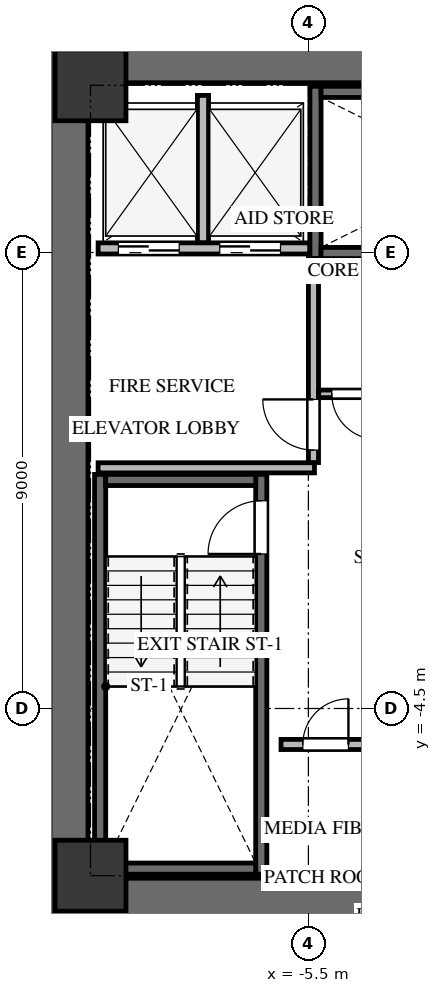
"""IFC4 building model, lengths in metres.
Left out: names, types, materials, properties, quantities, classifications, styles, units other than length and angle.
Written with IfcOpenShell. Run it as: python <this file> out.ifc"""

import sys

from ifc_helpers import new_model, si_unit, direction, frame, frame_2d, origin, origin_2d, place, context, subcontext, project, spatial, rectangle, extrude, source, transform, mapped, element, fill, save


model = new_model("IFC4")
c1 = context("Model", 3, precision=1e-05, world=origin(), true_north=direction((0.0, 1.0)))
c2 = subcontext(c1, "Body", "Model", "MODEL_VIEW")
j1 = project(units=[si_unit("LENGTHUNIT", "METRE"), si_unit("PLANEANGLEUNIT", "RADIAN")], contexts=[c1])
p1 = place(None, origin())
s1 = spatial("IfcSite", under=j1, at=p1, CompositionType="ELEMENT")
p2 = place(p1, origin())
s2 = spatial("IfcBuilding", under=s1, at=p2, CompositionType="ELEMENT")
p3 = place(p2, frame((0.0, 0.0, 110.7)))
s3 = spatial("IfcBuildingStorey", under=s2, at=p3, CompositionType="ELEMENT", Elevation=110.7)
p4 = place(p3, frame((-10.225, -8.6, 0.0), z_axis=(0.0, 0.0, 1.0), x_axis=(0.0, 1.0, 0.0)))
e1 = element("IfcWall", 1, at=p4, inside=s3, PredefinedType="SHEAR", context=c2, shape_type="SweptSolid", body=[
    extrude(rectangle(XDim=17.2, YDim=0.75, at=frame_2d((8.6, 0.0))), origin(), (0.0, 0.0, 1.0), 3.3),
])
p5 = place(p3, frame((-9.85, -8.225, 0.0), z_axis=(0.0, 0.0, 1.0), x_axis=(1.0, 0.0, 0.0)))
e2 = element("IfcWall", 2, at=p5, inside=s3, PredefinedType="SHEAR", context=c2, shape_type="SweptSolid", body=[
    extrude(rectangle(XDim=7.75, YDim=0.75, at=frame_2d((3.875, 0.0))), origin(), (0.0, 0.0, 1.0), 3.3),
])
p6 = place(p3, frame((-9.85, 8.225, 0.0), z_axis=(0.0, 0.0, 1.0), x_axis=(1.0, 0.0, 0.0)))
e3 = element("IfcWall", 3, at=p6, inside=s3, PredefinedType="SHEAR", context=c2, shape_type="SweptSolid", body=[
    extrude(rectangle(XDim=19.7, YDim=0.75, at=frame_2d((9.85, 0.0))), origin(), (0.0, 0.0, 1.0), 3.3),
])
p7 = place(p3, frame((-6.43, -7.77, -0.24), z_axis=(0.0, 0.0, 1.0), x_axis=(0.0, 1.0, 0.0)))
e4 = element("IfcWall", 4, at=p7, inside=s3, PredefinedType="SHEAR", context=c2, shape_type="SweptSolid", body=[
    extrude(rectangle(XDim=7.89, YDim=0.22, at=frame_2d((3.945, 0.0))), origin(), (0.0, 0.0, 1.0), 3.3),
])
p8 = place(p7, frame((6.32, 0.0, 0.0)))
e5 = element("IfcOpeningElement", 5, at=p8, cuts=e4, PredefinedType="OPENING", context=c2, shape_type="SweptSolid", body=[
    extrude(rectangle(XDim=1.05, YDim=2.15, at=frame_2d((0.525, 1.075))), frame((0.0, 0.12, 0.0), z_axis=(0.0, -1.0, 0.0), x_axis=(1.0, 0.0, 0.0)), (0.0, 0.0, 1.0), 0.24),
])
p9 = place(p3, frame((-9.61, 0.12, -0.24), z_axis=(0.0, 0.0, 1.0), x_axis=(0.0, -1.0, 0.0)))
e6 = element("IfcWall", 6, at=p9, inside=s3, PredefinedType="SHEAR", context=c2, shape_type="SweptSolid", body=[
    extrude(rectangle(XDim=7.89, YDim=0.22, at=frame_2d((3.945, 0.0))), origin(), (0.0, 0.0, 1.0), 3.3),
])
for number, where, z_axis, x_axis in (
    (7, (-9.5, -7.66, -0.24), (0.0, 0.0, 1.0), (1.0, 0.0, 0.0)),
    (8, (-6.54, 0.01, -0.24), (0.0, 0.0, 1.0), (-1.0, 0.0, 0.0)),
):
    element("IfcWall", number, at=place(p3, frame(where, z_axis=z_axis, x_axis=x_axis)), inside=s3, PredefinedType="SHEAR", context=c2, shape_type="SweptSolid", body=[
        extrude(rectangle(XDim=2.96, YDim=0.22, at=frame_2d((1.48, 0.0))), origin(), (0.0, 0.0, 1.0), 3.3),
    ])
p10 = place(p3, frame((-5.36, 7.78, -0.24), z_axis=(0.0, 0.0, 1.0), x_axis=(0.0, -1.0, 0.0)))
e9 = element("IfcWall", 9, at=p10, inside=s3, PredefinedType="SHEAR", context=c2, shape_type="SweptSolid", body=[
    extrude(rectangle(XDim=3.4, YDim=0.22, at=frame_2d((1.7, 0.0))), origin(), (0.0, 0.0, 1.0), 3.3),
])
p11 = place(p3, frame((-5.25, 4.49, -0.24), z_axis=(0.0, 0.0, 1.0), x_axis=(1.0, 0.0, 0.0)))
e10 = element("IfcWall", 10, at=p11, inside=s3, PredefinedType="SHEAR", context=c2, shape_type="SweptSolid", body=[
    extrude(rectangle(XDim=7.35, YDim=0.22, at=frame_2d((3.675, 0.0))), origin(), (0.0, 0.0, 1.0), 3.3),
])
p12 = place(p11, frame((5.85, 0.0, 0.0)))
e11 = element("IfcOpeningElement", 11, at=p12, cuts=e10, PredefinedType="OPENING", context=c2, shape_type="SweptSolid", body=[
    extrude(rectangle(XDim=1.05, YDim=2.15, at=frame_2d((0.525, 1.075))), frame((0.0, 0.12, 0.0), z_axis=(0.0, -1.0, 0.0), x_axis=(1.0, 0.0, 0.0)), (0.0, 0.0, 1.0), 0.24),
])
p13 = place(p3, frame((2.1, 7.67, -0.24), z_axis=(0.0, 0.0, 1.0), x_axis=(-1.0, 0.0, 0.0)))
e12 = element("IfcWall", 12, at=p13, inside=s3, PredefinedType="SHEAR", context=c2, shape_type="SweptSolid", body=[
    extrude(rectangle(XDim=7.35, YDim=0.22, at=frame_2d((3.675, 0.0))), origin(), (0.0, 0.0, 1.0), 3.3),
])
m1 = source(origin(), c2, "Body", "SweptSolid", [
    extrude(rectangle(XDim=1.4, YDim=1.4, at=origin_2d()), origin(), (0.0, 0.0, 1.0), 3.3),
])
for number, where, z_axis, x_axis in (
    (13, (-9.8, -7.8, -0.24), (0.0, 0.0, 1.0), (1.0, 0.0, 0.0)),
    (14, (-9.8, 7.8, -0.24), (0.0, 0.0, 1.0), (1.0, 0.0, 0.0)),
):
    element("IfcColumn", number, at=place(p3, frame(where, z_axis=z_axis, x_axis=x_axis)), inside=s3, PredefinedType="COLUMN", context=c2, shape_type="MappedRepresentation", body=[
        mapped(m1, transform((0.0, 0.0, 0.0), x_axis=(1.0, 0.0, 0.0), y_axis=(0.0, 1.0, 0.0), z_axis=(0.0, 0.0, 1.0), scale=1.0)),
    ])
p14 = place(p3, frame((-9.65, 4.58, 0.0), z_axis=(0.0, 0.0, 1.0), x_axis=(1.0, 0.0, 0.0)))
e15 = element("IfcWall", 15, at=p14, inside=s3, PredefinedType="SOLIDWALL", context=c2, shape_type="SweptSolid", body=[
    extrude(rectangle(XDim=4.175, YDim=0.22, at=frame_2d((2.087, 0.0))), origin(), (0.0, 0.0, 1.0), 3.045),
])
p15 = place(p14, frame((0.4, 0.0, 0.0)))
e16 = element("IfcOpeningElement", 16, at=p15, cuts=e15, PredefinedType="OPENING", context=c2, shape_type="SweptSolid", body=[
    extrude(rectangle(XDim=1.2, YDim=2.15, at=frame_2d((0.6, 1.075))), frame((0.0, 0.12, 0.0), z_axis=(0.0, -1.0, 0.0), x_axis=(1.0, 0.0, 0.0)), (0.0, 0.0, 1.0), 0.24),
])
p16 = place(p14, frame((2.4, 0.0, 0.0)))
e17 = element("IfcOpeningElement", 17, at=p16, cuts=e15, PredefinedType="OPENING", context=c2, shape_type="SweptSolid", body=[
    extrude(rectangle(XDim=1.2, YDim=2.15, at=frame_2d((0.6, 1.075))), frame((0.0, 0.12, 0.0), z_axis=(0.0, -1.0, 0.0), x_axis=(1.0, 0.0, 0.0)), (0.0, 0.0, 1.0), 0.24),
])
p17 = place(p3, frame((-7.58, 4.694, 0.0), z_axis=(0.0, 0.0, 1.0), x_axis=(0.0, 1.0, 0.0)))
e18 = element("IfcWall", 18, at=p17, inside=s3, PredefinedType="SOLIDWALL", context=c2, shape_type="SweptSolid", body=[
    extrude(rectangle(XDim=2.906, YDim=0.22, at=frame_2d((1.453, 0.0))), origin(), (0.0, 0.0, 1.0), 3.045),
])
p18 = place(p3, frame((-9.65, 0.25, 0.0), z_axis=(0.0, 0.0, 1.0), x_axis=(1.0, 0.0, 0.0)))
e19 = element("IfcWall", 19, at=p18, inside=s3, PredefinedType="SOLIDWALL", context=c2, shape_type="SweptSolid", body=[
    extrude(rectangle(XDim=4.27, YDim=0.2, at=frame_2d((2.135, 0.0))), origin(), (0.0, 0.0, 1.0), 3.045),
])
p19 = place(p3, frame((-5.4, 0.354, 0.0), z_axis=(0.0, 0.0, 1.0), x_axis=(0.0, 1.0, 0.0)))
e20 = element("IfcWall", 20, at=p19, inside=s3, PredefinedType="SOLIDWALL", context=c2, shape_type="SweptSolid", body=[
    extrude(rectangle(XDim=4.026, YDim=0.2, at=frame_2d((2.013, 0.0))), origin(), (0.0, 0.0, 1.0), 3.045),
])
p20 = place(p19, frame((0.246, 0.0, 0.0)))
e21 = element("IfcOpeningElement", 21, at=p20, cuts=e20, PredefinedType="OPENING", context=c2, shape_type="SweptSolid", body=[
    extrude(rectangle(XDim=1.0, YDim=2.15, at=frame_2d((0.5, 1.075))), frame((0.0, 0.11, 0.0), z_axis=(0.0, -1.0, 0.0), x_axis=(1.0, 0.0, 0.0)), (0.0, 0.0, 1.0), 0.22),
])
p21 = place(p3, frame((-6.04, -5.21, 0.0), z_axis=(0.0, 0.0, 1.0), x_axis=(1.0, 0.0, 0.0)))
e22 = element("IfcWall", 22, at=p21, inside=s3, PredefinedType="SOLIDWALL", context=c2, shape_type="SweptSolid", body=[
    extrude(rectangle(XDim=1.76, YDim=0.2, at=frame_2d((0.88, 0.0))), origin(), (0.0, 0.0, 1.0), 3.045),
])
p22 = place(p21, frame((0.43, 0.0, 0.0)))
e23 = element("IfcOpeningElement", 23, at=p22, cuts=e22, PredefinedType="OPENING", context=c2, shape_type="SweptSolid", body=[
    extrude(rectangle(XDim=0.9, YDim=2.05, at=frame_2d((0.45, 1.025))), frame((0.0, 0.11, 0.0), z_axis=(0.0, -1.0, 0.0), x_axis=(1.0, 0.0, 0.0)), (0.0, 0.0, 1.0), 0.22),
])
p23 = place(p3, frame((-3.88, 1.71, 0.0), z_axis=(0.0, 0.0, 1.0), x_axis=(-1.0, 0.0, 0.0)))
e24 = element("IfcWall", 24, at=p23, inside=s3, PredefinedType="PARTITIONING", context=c2, shape_type="SweptSolid", body=[
    extrude(rectangle(XDim=1.416, YDim=0.15, at=frame_2d((0.708, 0.0))), origin(), (0.0, 0.0, 1.0), 3.045),
])
p24 = place(p23, frame((0.258, 0.0, 0.0)))
e25 = element("IfcOpeningElement", 25, at=p24, cuts=e24, PredefinedType="OPENING", context=c2, shape_type="SweptSolid", body=[
    extrude(rectangle(XDim=0.9, YDim=2.05, at=frame_2d((0.45, 1.025))), frame((0.0, 0.085, 0.0), z_axis=(0.0, -1.0, 0.0), x_axis=(1.0, 0.0, 0.0)), (0.0, 0.0, 1.0), 0.17),
])
m2 = source(origin(), c2, "Body", "SweptSolid", [
    extrude(rectangle(XDim=1.05, YDim=2.15, at=frame_2d((0.525, 1.075))), frame((0.0, 0.025, 0.0), z_axis=(0.0, -1.0, 0.0), x_axis=(1.0, 0.0, 0.0)), (0.0, 0.0, 1.0), 0.05),
])
p25 = place(p8, origin())
e26 = element("IfcDoor", 26, at=p25, inside=s3, OperationType="SINGLE_SWING_LEFT", PredefinedType="DOOR", context=c2, shape_type="MappedRepresentation", body=[
    mapped(m2, transform((0.0, 0.0, 0.0), x_axis=(1.0, 0.0, 0.0), y_axis=(0.0, 1.0, 0.0), z_axis=(0.0, 0.0, 1.0), scale=1.0)),
])
fill(e5, e26)
m3 = source(origin(), c2, "Body", "SweptSolid", [
    extrude(rectangle(XDim=1.2, YDim=2.15, at=frame_2d((0.6, 1.075))), frame((0.0, 0.025, 0.0), z_axis=(0.0, -1.0, 0.0), x_axis=(1.0, 0.0, 0.0)), (0.0, 0.0, 1.0), 0.05),
])
p26 = place(p15, origin())
e27 = element("IfcDoor", 27, at=p26, inside=s3, OperationType="DOUBLE_DOOR_SLIDING", PredefinedType="DOOR", context=c2, shape_type="MappedRepresentation", body=[
    mapped(m3, transform((0.0, 0.0, 0.0), x_axis=(1.0, 0.0, 0.0), y_axis=(0.0, 1.0, 0.0), z_axis=(0.0, 0.0, 1.0), scale=1.0)),
])
fill(e16, e27)
p27 = place(p16, origin())
e28 = element("IfcDoor", 28, at=p27, inside=s3, OperationType="DOUBLE_DOOR_SLIDING", PredefinedType="DOOR", context=c2, shape_type="MappedRepresentation", body=[
    mapped(m3, transform((0.0, 0.0, 0.0), x_axis=(1.0, 0.0, 0.0), y_axis=(0.0, 1.0, 0.0), z_axis=(0.0, 0.0, 1.0), scale=1.0)),
])
fill(e17, e28)
m4 = source(origin(), c2, "Body", "SweptSolid", [
    extrude(rectangle(XDim=1.0, YDim=2.15, at=frame_2d((0.5, 1.075))), frame((0.0, 0.025, 0.0), z_axis=(0.0, -1.0, 0.0), x_axis=(1.0, 0.0, 0.0)), (0.0, 0.0, 1.0), 0.05),
])
p28 = place(p20, origin())
e29 = element("IfcDoor", 29, at=p28, inside=s3, OperationType="SINGLE_SWING_RIGHT", PredefinedType="DOOR", context=c2, shape_type="MappedRepresentation", body=[
    mapped(m4, transform((0.0, 0.0, 0.0), x_axis=(1.0, 0.0, 0.0), y_axis=(0.0, 1.0, 0.0), z_axis=(0.0, 0.0, 1.0), scale=1.0)),
])
fill(e21, e29)
m5 = source(origin(), c2, "Body", "SweptSolid", [
    extrude(rectangle(XDim=0.9, YDim=2.05, at=frame_2d((0.45, 1.025))), frame((0.0, 0.025, 0.0), z_axis=(0.0, -1.0, 0.0), x_axis=(1.0, 0.0, 0.0)), (0.0, 0.0, 1.0), 0.05),
])
p29 = place(p22, origin())
e30 = element("IfcDoor", 30, at=p29, inside=s3, OperationType="SINGLE_SWING_RIGHT", PredefinedType="DOOR", context=c2, shape_type="MappedRepresentation", body=[
    mapped(m5, transform((0.0, 0.0, 0.0), x_axis=(1.0, 0.0, 0.0), y_axis=(0.0, 1.0, 0.0), z_axis=(0.0, 0.0, 1.0), scale=1.0)),
])
fill(e23, e30)
m6 = source(origin(), c2, "Body", "SweptSolid", [
    extrude(rectangle(XDim=0.9, YDim=2.05, at=frame_2d((0.45, 1.025))), frame((0.0, 0.025, 0.0), z_axis=(0.0, -1.0, 0.0), x_axis=(1.0, 0.0, 0.0)), (0.0, 0.0, 1.0), 0.05),
])
p30 = place(p24, origin())
e31 = element("IfcDoor", 31, at=p30, inside=s3, OperationType="SINGLE_SWING_LEFT", PredefinedType="DOOR", context=c2, shape_type="MappedRepresentation", body=[
    mapped(m6, transform((0.0, 0.0, 0.0), x_axis=(1.0, 0.0, 0.0), y_axis=(0.0, 1.0, 0.0), z_axis=(0.0, 0.0, 1.0), scale=1.0)),
])
fill(e25, e31)
save(model, sys.argv[1])
